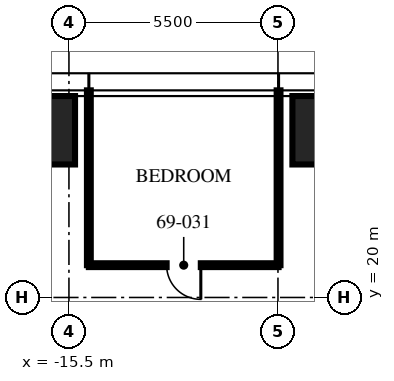
"""IFC4 building model, lengths in metres.
Left out: names, types, materials, properties, quantities, classifications, styles, units other than length and angle.
Written with IfcOpenShell. Run it as: python <this file> out.ifc"""

import sys

from ifc_helpers import new_model, si_unit, direction, frame, frame_2d, origin, origin_2d, place, context, subcontext, project, spatial, rectangle, hollow_rectangle, extrude, element, fill, save


model = new_model("IFC4")
c1 = context("Model", 3, precision=1e-05, world=origin(), true_north=direction((0.0, 1.0)))
c2 = subcontext(c1, "Body", "Model", "MODEL_VIEW")
j1 = project(units=[si_unit("LENGTHUNIT", "METRE"), si_unit("PLANEANGLEUNIT", "RADIAN")], contexts=[c1])
p1 = place(None, origin())
s1 = spatial("IfcSite", under=j1, at=p1, CompositionType="ELEMENT")
p2 = place(p1, origin())
s2 = spatial("IfcBuilding", under=s1, at=p2, CompositionType="ELEMENT")
p3 = place(p2, frame((0.0, 0.0, 274.5)))
s3 = spatial("IfcBuildingStorey", under=s2, at=p3, CompositionType="ELEMENT", Elevation=274.5)
p4 = place(p3, frame((-16.64, 24.4, 0.0), z_axis=(0.0, 0.0, 1.0), x_axis=(1.0, 0.0, 0.0)))
e1 = element("IfcColumn", 1, at=p4, inside=s3, PredefinedType="COLUMN", context=c2, shape_type="SweptSolid", body=[
    extrude(hollow_rectangle(XDim=2.6, YDim=1.8, WallThickness=0.14, at=origin_2d()), origin(), (0.0, 0.0, 1.0), 2.51),
])
p5 = place(p3, frame((-8.32, 24.4, 0.0), z_axis=(0.0, 0.0, 1.0), x_axis=(1.0, 0.0, 0.0)))
e2 = element("IfcColumn", 2, at=p5, inside=s3, PredefinedType="COLUMN", context=c2, shape_type="SweptSolid", body=[
    extrude(hollow_rectangle(XDim=2.6, YDim=1.8, WallThickness=0.14, at=origin_2d()), origin(), (0.0, 0.0, 1.0), 2.64),
])
for number, where, z_axis, x_axis in (
    (3, (-9.984, 20.85, 0.0), (0.0, 0.0, 1.0), (0.0, 1.0, 0.0)),
    (4, (-14.976, 20.85, 0.0), (0.0, 0.0, 1.0), (0.0, 1.0, 0.0)),
):
    element("IfcWall", number, at=place(p3, frame(where, z_axis=z_axis, x_axis=x_axis)), inside=s3, PredefinedType="PARTITIONING", context=c2, shape_type="SweptSolid", body=[
        extrude(rectangle(XDim=4.6, YDim=0.1, at=frame_2d((2.3, 0.0))), origin(), (0.0, 0.0, 1.0), 2.75),
    ])
p6 = place(p3, frame((-9.984, 20.85, 0.0), z_axis=(0.0, 0.0, 1.0), x_axis=(-1.0, 0.0, 0.0)))
e5 = element("IfcWall", 5, at=p6, inside=s3, PredefinedType="PARTITIONING", context=c2, shape_type="SweptSolid", body=[
    extrude(rectangle(XDim=4.992, YDim=0.1, at=frame_2d((2.496, 0.0))), origin(), (0.0, 0.0, 1.0), 2.2),
])
p7 = place(p6, frame((2.046, 0.0, 0.0)))
e6 = element("IfcOpeningElement", 6, at=p7, cuts=e5, PredefinedType="OPENING", context=c2, shape_type="SweptSolid", body=[
    extrude(rectangle(XDim=0.9, YDim=2.1, at=frame_2d((0.45, 1.05))), frame((0.0, 0.06, 0.0), z_axis=(0.0, -1.0, 0.0), x_axis=(1.0, 0.0, 0.0)), (0.0, 0.0, 1.0), 0.12),
])
p8 = place(p7, origin())
e7 = element("IfcDoor", 7, at=p8, inside=s3, OperationType="SINGLE_SWING_LEFT", PredefinedType="DOOR", context=c2, shape_type="SweptSolid", body=[
    extrude(rectangle(XDim=0.9, YDim=2.1, at=frame_2d((0.45, 1.05))), frame((0.0, 0.025, 0.0), z_axis=(0.0, -1.0, 0.0), x_axis=(1.0, 0.0, 0.0)), (0.0, 0.0, 1.0), 0.05),
])
fill(e6, e7)
save(model, sys.argv[1])
